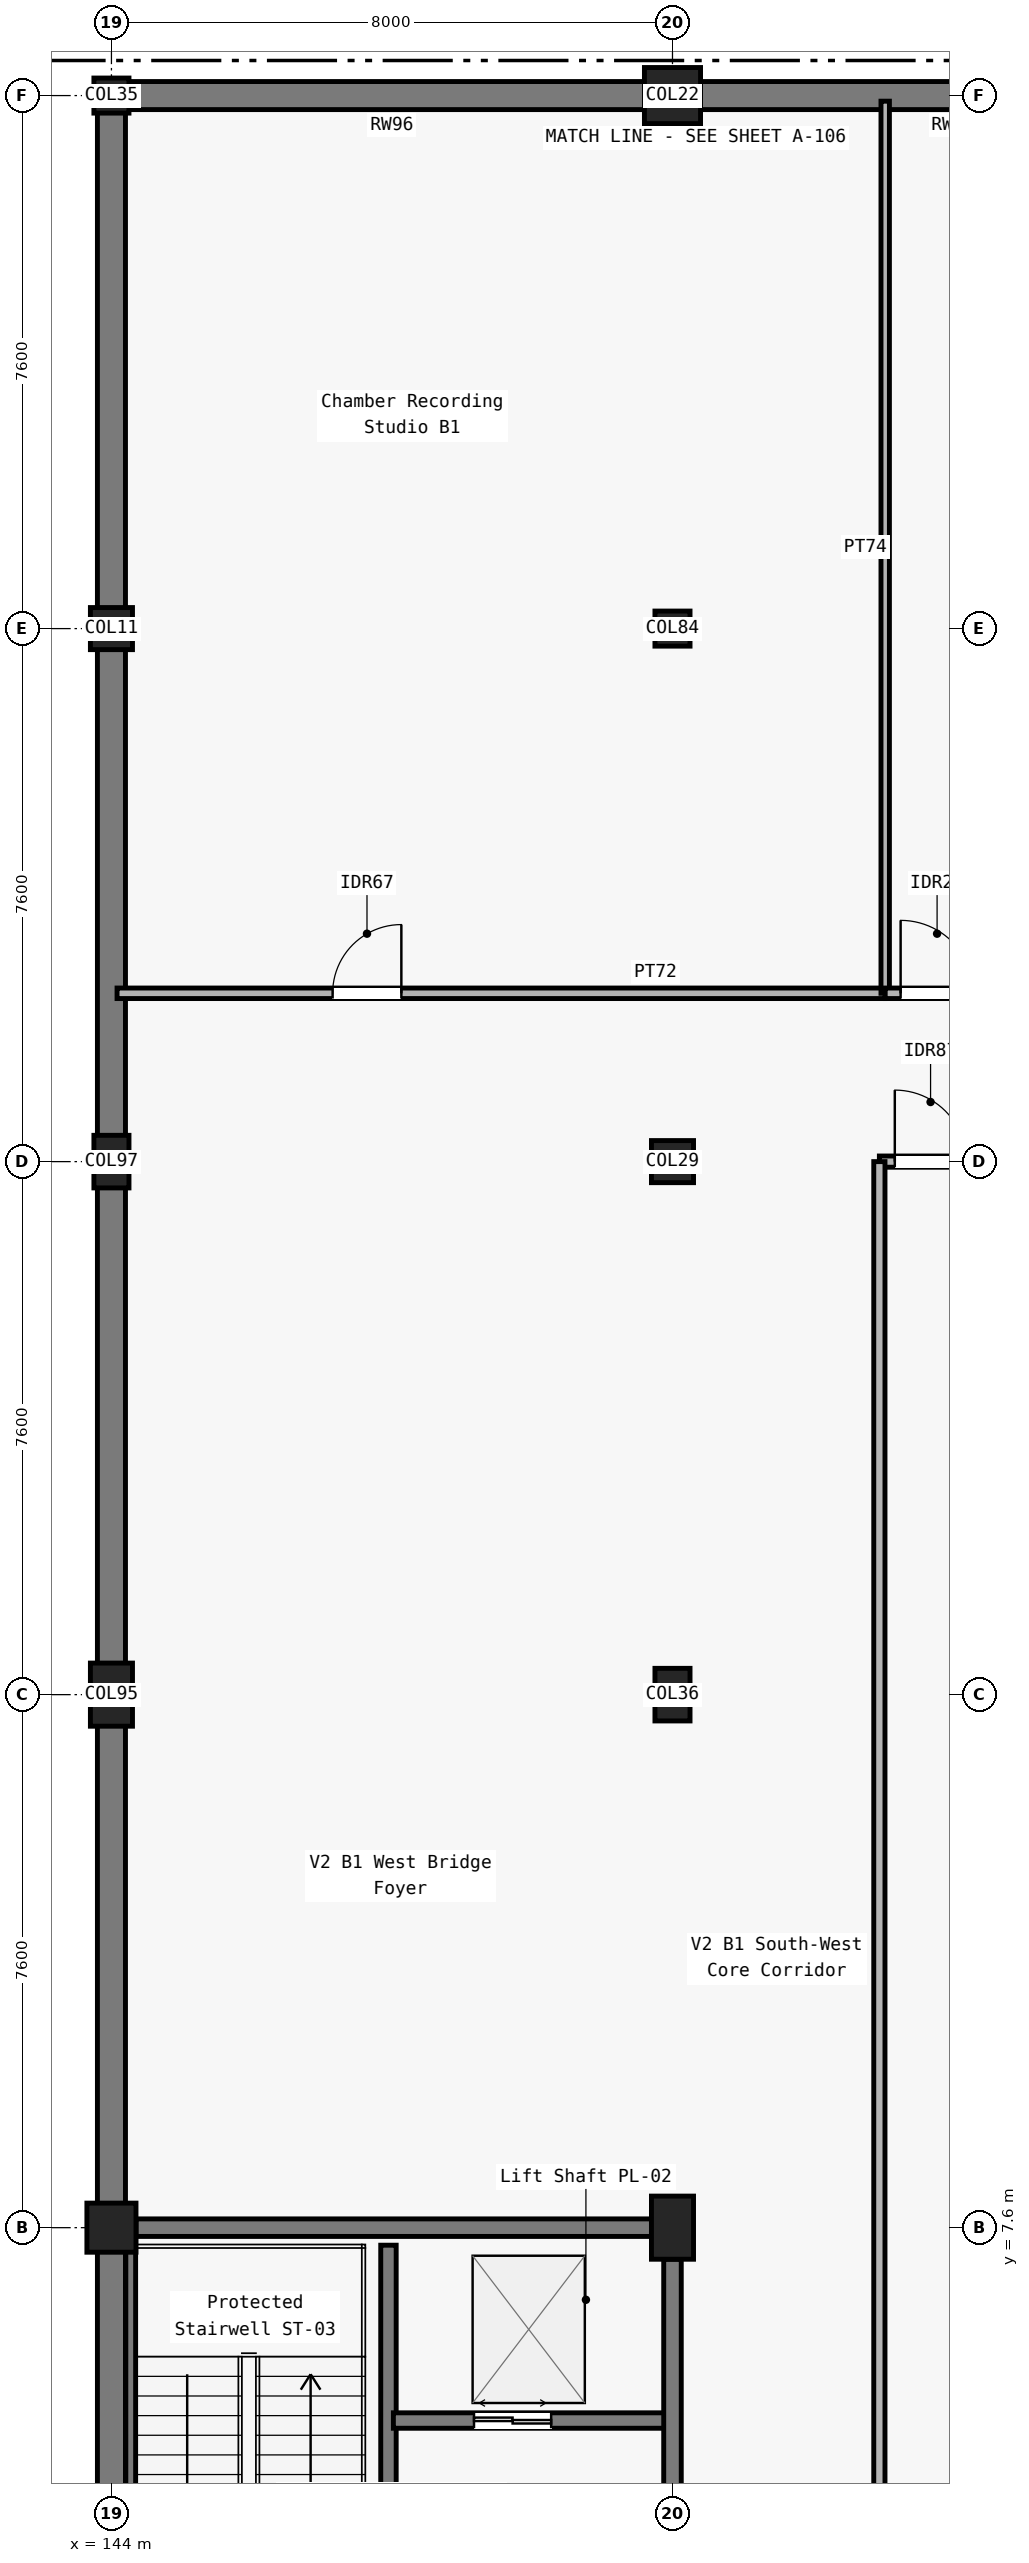
"""IFC4 building model, lengths in metres.
Left out: names, types, materials, properties, quantities, classifications, styles, units other than length and angle.
Written with IfcOpenShell. Run it as: python <this file> out.ifc"""

import sys

from ifc_helpers import new_model, si_unit, direction, frame, frame_2d, origin, origin_2d, place, context, subcontext, project, spatial, rectangle, circle, extrude, element, fill, save


model = new_model("IFC4")
c1 = context("Model", 3, precision=1e-05, world=origin(), true_north=direction((0.0, 1.0)))
c2 = subcontext(c1, "Body", "Model", "MODEL_VIEW")
j1 = project(units=[si_unit("LENGTHUNIT", "METRE"), si_unit("PLANEANGLEUNIT", "RADIAN")], contexts=[c1])
p1 = place(None, origin())
s1 = spatial("IfcSite", under=j1, at=p1, CompositionType="ELEMENT")
p2 = place(p1, origin())
s2 = spatial("IfcBuilding", under=s1, at=p2, CompositionType="ELEMENT")
p3 = place(p2, frame((0.0, 0.0, -5.4)))
s3 = spatial("IfcBuildingStorey", under=s2, at=p3, CompositionType="ELEMENT", Elevation=-5.4)
for number, where, z_axis, x_axis in (
    (1, (152.0, 38.0, 0.0), (0.0, 0.0, 1.0), (-1.0, 0.0, 0.0)),
    (2, (160.0, 38.0, 0.0), (0.0, 0.0, 1.0), (-1.0, 0.0, 0.0)),
):
    element("IfcWall", number, at=place(p3, frame(where, z_axis=z_axis, x_axis=x_axis)), inside=s3, PredefinedType="USERDEFINED", context=c2, shape_type="SweptSolid", body=[
        extrude(rectangle(XDim=8.0, YDim=0.4, at=frame_2d((4.0, 0.0))), origin(), (0.0, 0.0, 1.0), 5.08),
    ])
p4 = place(p3, frame((144.0, 7.6, 0.0), z_axis=(0.0, 0.0, 1.0), x_axis=(0.0, -1.0, 0.0)))
e3 = element("IfcWall", 3, at=p4, inside=s3, PredefinedType="USERDEFINED", context=c2, shape_type="SweptSolid", body=[
    extrude(rectangle(XDim=7.6, YDim=0.4, at=frame_2d((3.8, 0.0))), origin(), (0.0, 0.0, 1.0), 5.08),
])
p5 = place(p3, frame((144.0, 15.2, 0.0), z_axis=(0.0, 0.0, 1.0), x_axis=(0.0, -1.0, 0.0)))
e4 = element("IfcWall", 4, at=p5, inside=s3, PredefinedType="USERDEFINED", context=c2, shape_type="SweptSolid", body=[
    extrude(rectangle(XDim=7.6, YDim=0.4, at=frame_2d((3.8, 0.0))), origin(), (0.0, 0.0, 1.0), 5.08),
])
p6 = place(p3, frame((144.0, 22.8, 0.0), z_axis=(0.0, 0.0, 1.0), x_axis=(0.0, -1.0, 0.0)))
e5 = element("IfcWall", 5, at=p6, inside=s3, PredefinedType="USERDEFINED", context=c2, shape_type="SweptSolid", body=[
    extrude(rectangle(XDim=7.6, YDim=0.4, at=frame_2d((3.8, 0.0))), origin(), (0.0, 0.0, 1.0), 5.08),
])
p7 = place(p3, frame((144.0, 30.4, 0.0), z_axis=(0.0, 0.0, 1.0), x_axis=(0.0, -1.0, 0.0)))
e6 = element("IfcWall", 6, at=p7, inside=s3, PredefinedType="USERDEFINED", context=c2, shape_type="SweptSolid", body=[
    extrude(rectangle(XDim=7.6, YDim=0.4, at=frame_2d((3.8, 0.0))), origin(), (0.0, 0.0, 1.0), 5.08),
])
p8 = place(p3, frame((144.0, 38.0, 0.0), z_axis=(0.0, 0.0, 1.0), x_axis=(0.0, -1.0, 0.0)))
e7 = element("IfcWall", 7, at=p8, inside=s3, PredefinedType="USERDEFINED", context=c2, shape_type="SweptSolid", body=[
    extrude(rectangle(XDim=7.6, YDim=0.4, at=frame_2d((3.8, 0.0))), origin(), (0.0, 0.0, 1.0), 5.08),
])
p9 = place(p3, frame((144.0, 7.6, 0.0), z_axis=(0.0, 0.0, 1.0), x_axis=(1.0, 0.0, 0.0)))
e8 = element("IfcColumn", 8, at=p9, inside=s3, PredefinedType="COLUMN", context=c2, shape_type="SweptSolid", body=[
    extrude(rectangle(XDim=0.7, YDim=0.7, at=origin_2d()), origin(), (0.0, 0.0, 1.0), 5.4),
])
p10 = place(p3, frame((144.0, 15.2, 0.0), z_axis=(0.0, 0.0, 1.0), x_axis=(1.0, 0.0, 0.0)))
e9 = element("IfcColumn", 9, at=p10, inside=s3, PredefinedType="COLUMN", context=c2, shape_type="SweptSolid", body=[
    extrude(rectangle(XDim=0.6, YDim=0.9, at=origin_2d()), origin(), (0.0, 0.0, 1.0), 5.4),
])
p11 = place(p3, frame((144.0, 22.8, 0.0), z_axis=(0.0, 0.0, 1.0), x_axis=(1.0, 0.0, 0.0)))
e10 = element("IfcColumn", 10, at=p11, inside=s3, PredefinedType="COLUMN", context=c2, shape_type="SweptSolid", body=[
    extrude(rectangle(XDim=0.5, YDim=0.75, at=origin_2d()), origin(), (0.0, 0.0, 1.0), 5.4),
])
p12 = place(p3, frame((144.0, 30.4, 0.0), z_axis=(0.0, 0.0, 1.0), x_axis=(1.0, 0.0, 0.0)))
e11 = element("IfcColumn", 11, at=p12, inside=s3, PredefinedType="COLUMN", context=c2, shape_type="SweptSolid", body=[
    extrude(rectangle(XDim=0.6, YDim=0.6, at=origin_2d()), origin(), (0.0, 0.0, 1.0), 5.4),
])
p13 = place(p3, frame((144.0, 38.0, 0.0), z_axis=(0.0, 0.0, 1.0), x_axis=(1.0, 0.0, 0.0)))
e12 = element("IfcColumn", 12, at=p13, inside=s3, PredefinedType="COLUMN", context=c2, shape_type="SweptSolid", body=[
    extrude(rectangle(XDim=0.5, YDim=0.5, at=origin_2d()), origin(), (0.0, 0.0, 1.0), 5.4),
])
p14 = place(p3, frame((152.0, 7.6, 0.0), z_axis=(0.0, 0.0, 1.0), x_axis=(1.0, 0.0, 0.0)))
e13 = element("IfcColumn", 13, at=p14, inside=s3, PredefinedType="COLUMN", context=c2, shape_type="SweptSolid", body=[
    extrude(rectangle(XDim=0.6, YDim=0.9, at=origin_2d()), origin(), (0.0, 0.0, 1.0), 5.4),
])
p15 = place(p3, frame((152.0, 15.2, 0.0), z_axis=(0.0, 0.0, 1.0), x_axis=(1.0, 0.0, 0.0)))
e14 = element("IfcColumn", 14, at=p15, inside=s3, PredefinedType="COLUMN", context=c2, shape_type="SweptSolid", body=[
    extrude(rectangle(XDim=0.5, YDim=0.75, at=origin_2d()), origin(), (0.0, 0.0, 1.0), 5.4),
])
p16 = place(p3, frame((152.0, 22.8, 0.0), z_axis=(0.0, 0.0, 1.0), x_axis=(1.0, 0.0, 0.0)))
e15 = element("IfcColumn", 15, at=p16, inside=s3, PredefinedType="COLUMN", context=c2, shape_type="SweptSolid", body=[
    extrude(rectangle(XDim=0.6, YDim=0.6, at=origin_2d()), origin(), (0.0, 0.0, 1.0), 5.4),
])
p17 = place(p3, frame((152.0, 30.4, 0.0), z_axis=(0.0, 0.0, 1.0), x_axis=(1.0, 0.0, 0.0)))
e16 = element("IfcColumn", 16, at=p17, inside=s3, PredefinedType="COLUMN", context=c2, shape_type="SweptSolid", body=[
    extrude(rectangle(XDim=0.5, YDim=0.5, at=origin_2d()), origin(), (0.0, 0.0, 1.0), 5.4),
])
p18 = place(p3, frame((152.0, 38.0, 0.0), z_axis=(0.0, 0.0, 1.0), x_axis=(1.0, 0.0, 0.0)))
e17 = element("IfcColumn", 17, at=p18, inside=s3, PredefinedType="COLUMN", context=c2, shape_type="SweptSolid", body=[
    extrude(circle(Radius=0.4, at=origin_2d()), origin(), (0.0, 0.0, 1.0), 5.4),
])
p19 = place(p3, frame((144.35, 7.6, 0.0), z_axis=(0.0, 0.0, 1.0), x_axis=(1.0, 0.0, 0.0)))
e18 = element("IfcWall", 18, at=p19, inside=s3, PredefinedType="SOLIDWALL", context=c2, shape_type="SweptSolid", body=[
    extrude(rectangle(XDim=7.35, YDim=0.25, at=frame_2d((3.675, 0.0))), origin(), (0.0, 0.0, 1.0), 4.33),
])
p20 = place(p3, frame((147.95, 0.25, 0.0), z_axis=(0.0, 0.0, 1.0), x_axis=(0.0, 1.0, 0.0)))
e19 = element("IfcWall", 19, at=p20, inside=s3, PredefinedType="SOLIDWALL", context=c2, shape_type="SweptSolid", body=[
    extrude(rectangle(XDim=7.1, YDim=0.22, at=frame_2d((3.55, 0.0))), origin(), (0.0, 0.0, 1.0), 5.08),
])
p21 = place(p20, frame((0.35, 0.0, 0.0)))
e20 = element("IfcOpeningElement", 20, at=p21, cuts=e19, PredefinedType="OPENING", context=c2, shape_type="SweptSolid", body=[
    extrude(rectangle(XDim=1.2, YDim=2.15, at=frame_2d((0.6, 1.075))), frame((0.0, 0.12, 0.0), z_axis=(0.0, -1.0, 0.0), x_axis=(1.0, 0.0, 0.0)), (0.0, 0.0, 1.0), 0.24),
])
p22 = place(p3, frame((148.02, 4.85, 0.0), z_axis=(0.0, 0.0, 1.0), x_axis=(1.0, 0.0, 0.0)))
e21 = element("IfcWall", 21, at=p22, inside=s3, PredefinedType="SOLIDWALL", context=c2, shape_type="SweptSolid", body=[
    extrude(rectangle(XDim=3.93, YDim=0.22, at=frame_2d((1.965, 0.0))), origin(), (0.0, 0.0, 1.0), 4.455),
])
p23 = place(p22, frame((1.15, 0.0, 0.0)))
e22 = element("IfcOpeningElement", 22, at=p23, cuts=e21, PredefinedType="OPENING", context=c2, shape_type="SweptSolid", body=[
    extrude(rectangle(XDim=1.1, YDim=2.2, at=frame_2d((0.55, 1.1))), frame((0.0, 0.12, 0.0), z_axis=(0.0, -1.0, 0.0), x_axis=(1.0, 0.0, 0.0)), (0.0, 0.0, 1.0), 0.24),
])
p24 = place(p3, frame((152.0, 0.35, 0.0), z_axis=(0.0, 0.0, 1.0), x_axis=(0.0, 1.0, 0.0)))
e23 = element("IfcWall", 23, at=p24, inside=s3, PredefinedType="SOLIDWALL", context=c2, shape_type="SweptSolid", body=[
    extrude(rectangle(XDim=6.8, YDim=0.25, at=frame_2d((3.4, 0.0))), origin(), (0.0, 0.0, 1.0), 4.45),
])
p25 = place(p24, frame((2.0, 0.0, 0.0)))
e24 = element("IfcOpeningElement", 24, at=p25, cuts=e23, PredefinedType="OPENING", context=c2, shape_type="SweptSolid", body=[
    extrude(rectangle(XDim=1.35, YDim=2.2, at=frame_2d((0.675, 1.1))), frame((0.0, 0.135, 0.0), z_axis=(0.0, -1.0, 0.0), x_axis=(1.0, 0.0, 0.0)), (0.0, 0.0, 1.0), 0.27),
])
p26 = place(p3, frame((154.95, 22.8, 0.0), z_axis=(0.0, 0.0, 1.0), x_axis=(1.0, 0.0, 0.0)))
e25 = element("IfcWall", 25, at=p26, inside=s3, PredefinedType="PARTITIONING", context=c2, shape_type="SweptSolid", body=[
    extrude(rectangle(XDim=11.065, YDim=0.16, at=frame_2d((5.532, 0.0))), origin(), (0.0, 0.0, 1.0), 4.12),
])
p27 = place(p26, frame((0.22, 0.0, 0.0)))
e26 = element("IfcOpeningElement", 26, at=p27, cuts=e25, PredefinedType="OPENING", context=c2, shape_type="SweptSolid", body=[
    extrude(rectangle(XDim=1.02, YDim=2.1, at=frame_2d((0.51, 1.05))), frame((0.0, 0.09, 0.0), z_axis=(0.0, -1.0, 0.0), x_axis=(1.0, 0.0, 0.0)), (0.0, 0.0, 1.0), 0.18),
])
p28 = place(p3, frame((154.95, 0.08, 0.0), z_axis=(0.0, 0.0, 1.0), x_axis=(0.0, 1.0, 0.0)))
e27 = element("IfcWall", 27, at=p28, inside=s3, PredefinedType="PARTITIONING", context=c2, shape_type="SweptSolid", body=[
    extrude(rectangle(XDim=22.72, YDim=0.16, at=frame_2d((11.36, 0.0))), origin(), (0.0, 0.0, 1.0), 4.12),
])
p29 = place(p3, frame((144.08, 25.2, 0.0), z_axis=(0.0, 0.0, 1.0), x_axis=(1.0, 0.0, 0.0)))
e28 = element("IfcWall", 28, at=p29, inside=s3, PredefinedType="PARTITIONING", context=c2, shape_type="SweptSolid", body=[
    extrude(rectangle(XDim=10.953, YDim=0.15, at=frame_2d((5.477, 0.0))), origin(), (0.0, 0.0, 1.0), 4.305),
])
p30 = place(p29, frame((3.074, 0.0, 0.0)))
e29 = element("IfcOpeningElement", 29, at=p30, cuts=e28, PredefinedType="OPENING", context=c2, shape_type="SweptSolid", body=[
    extrude(rectangle(XDim=0.98, YDim=2.15, at=frame_2d((0.49, 1.075))), frame((0.0, 0.085, 0.0), z_axis=(0.0, -1.0, 0.0), x_axis=(1.0, 0.0, 0.0)), (0.0, 0.0, 1.0), 0.17),
])
p31 = place(p3, frame((155.033, 25.2, 0.0), z_axis=(0.0, 0.0, 1.0), x_axis=(0.0, 1.0, 0.0)))
e30 = element("IfcWall", 30, at=p31, inside=s3, PredefinedType="PARTITIONING", context=c2, shape_type="SweptSolid", body=[
    extrude(rectangle(XDim=12.72, YDim=0.12, at=frame_2d((6.36, 0.0))), origin(), (0.0, 0.0, 1.0), 4.305),
])
p32 = place(p3, frame((155.033, 25.2, 0.0), z_axis=(0.0, 0.0, 1.0), x_axis=(1.0, 0.0, 0.0)))
e31 = element("IfcWall", 31, at=p32, inside=s3, PredefinedType="PARTITIONING", context=c2, shape_type="SweptSolid", body=[
    extrude(rectangle(XDim=8.68, YDim=0.15, at=frame_2d((4.34, 0.0))), origin(), (0.0, 0.0, 1.0), 4.255),
])
p33 = place(p32, frame((0.22, 0.0, 0.0)))
e32 = element("IfcOpeningElement", 32, at=p33, cuts=e31, PredefinedType="OPENING", context=c2, shape_type="SweptSolid", body=[
    extrude(rectangle(XDim=1.04, YDim=2.15, at=frame_2d((0.52, 1.075))), frame((0.0, 0.085, 0.0), z_axis=(0.0, -1.0, 0.0), x_axis=(1.0, 0.0, 0.0)), (0.0, 0.0, 1.0), 0.17),
])
p34 = place(p3, frame((144.275, 0.15, 0.0), z_axis=(0.0, 0.0, 1.0), x_axis=(0.0, 1.0, 0.0)))
e33 = element("IfcWall", 33, at=p34, inside=s3, PredefinedType="SOLIDWALL", context=c2, shape_type="SweptSolid", body=[
    extrude(rectangle(XDim=7.3, YDim=0.14, at=frame_2d((3.65, 0.0))), origin(), (0.0, 0.0, 1.0), 5.08),
])
p35 = place(p23, origin())
e34 = element("IfcDoor", 34, at=p35, inside=s3, OperationType="DOUBLE_DOOR_SLIDING", PredefinedType="DOOR", context=c2, shape_type="SweptSolid", body=[
    extrude(rectangle(XDim=1.1, YDim=2.2, at=frame_2d((0.55, 1.1))), frame((0.0, 0.025, 0.0), z_axis=(0.0, -1.0, 0.0), x_axis=(1.0, 0.0, 0.0)), (0.0, 0.0, 1.0), 0.05),
])
fill(e22, e34)
p36 = place(p27, origin())
e35 = element("IfcDoor", 35, at=p36, inside=s3, OperationType="SINGLE_SWING_LEFT", PredefinedType="DOOR", context=c2, shape_type="SweptSolid", body=[
    extrude(rectangle(XDim=1.02, YDim=2.1, at=frame_2d((0.51, 1.05))), frame((0.0, 0.025, 0.0), z_axis=(0.0, -1.0, 0.0), x_axis=(1.0, 0.0, 0.0)), (0.0, 0.0, 1.0), 0.05),
])
fill(e26, e35)
p37 = place(p30, origin())
e36 = element("IfcDoor", 36, at=p37, inside=s3, OperationType="SINGLE_SWING_RIGHT", PredefinedType="DOOR", context=c2, shape_type="SweptSolid", body=[
    extrude(rectangle(XDim=0.98, YDim=2.15, at=frame_2d((0.49, 1.075))), frame((0.0, 0.025, 0.0), z_axis=(0.0, -1.0, 0.0), x_axis=(1.0, 0.0, 0.0)), (0.0, 0.0, 1.0), 0.05),
])
fill(e29, e36)
p38 = place(p33, origin())
e37 = element("IfcDoor", 37, at=p38, inside=s3, OperationType="SINGLE_SWING_LEFT", PredefinedType="DOOR", context=c2, shape_type="SweptSolid", body=[
    extrude(rectangle(XDim=1.04, YDim=2.15, at=frame_2d((0.52, 1.075))), frame((0.0, 0.025, 0.0), z_axis=(0.0, -1.0, 0.0), x_axis=(1.0, 0.0, 0.0)), (0.0, 0.0, 1.0), 0.05),
])
fill(e32, e37)
save(model, sys.argv[1])
